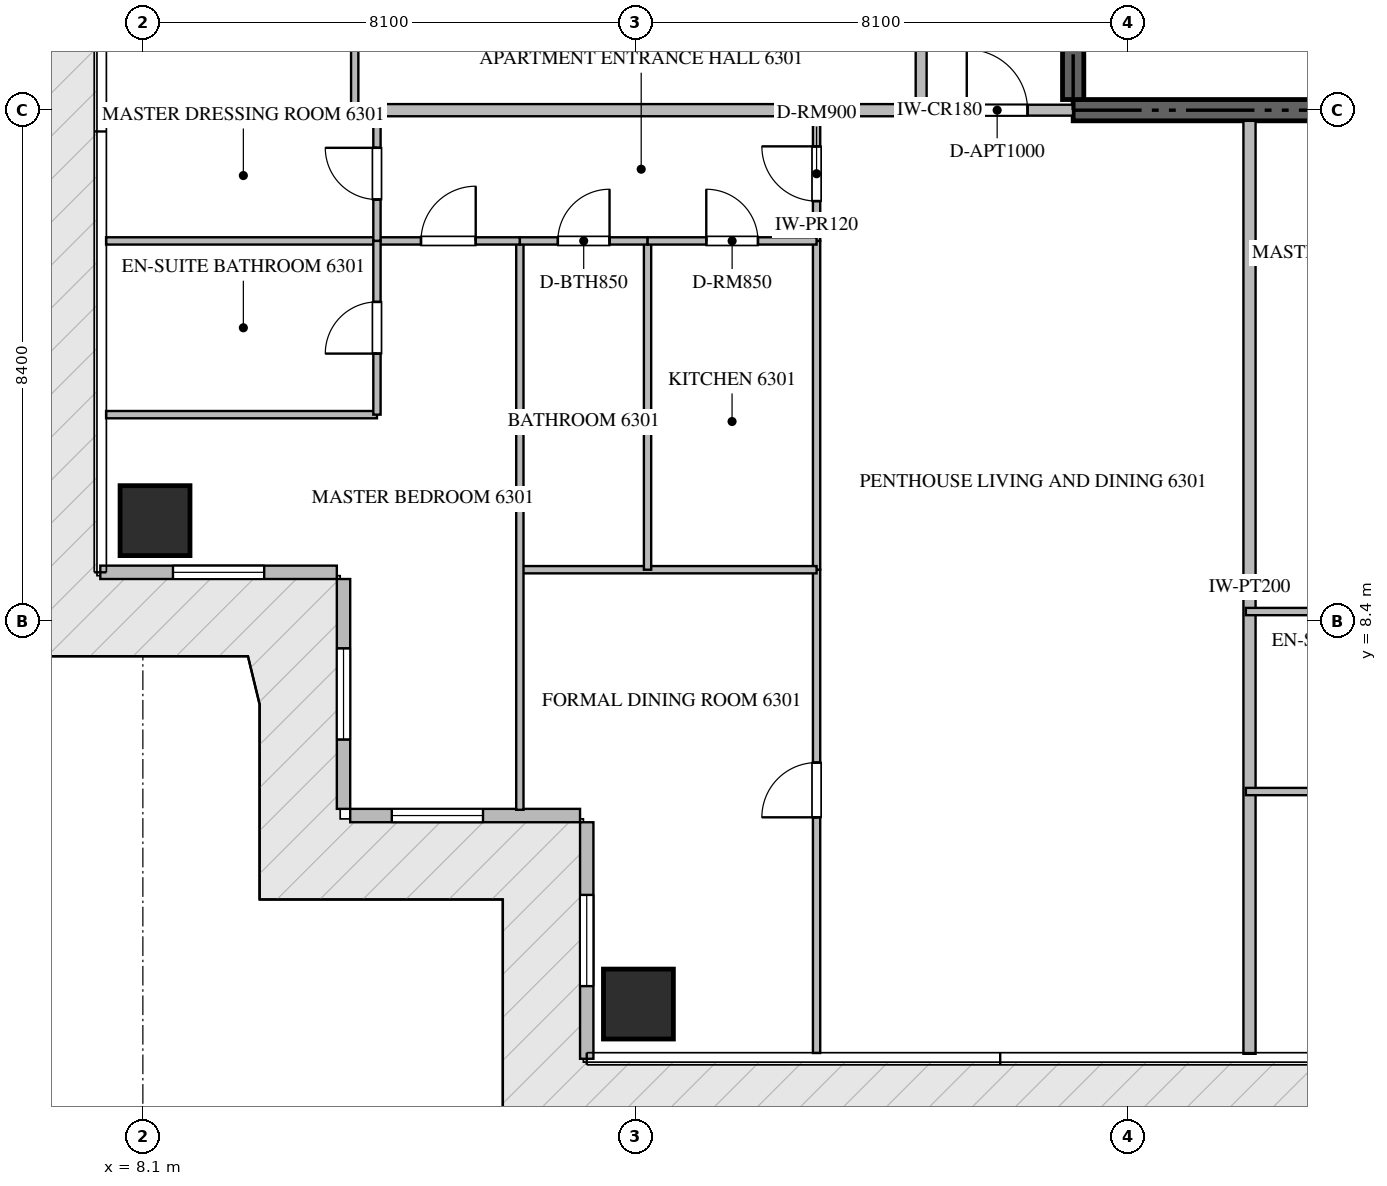
"""IFC4 building model, lengths in metres.
Left out: names, types, materials, properties, quantities, classifications, styles, units other than length and angle.
Written with IfcOpenShell. Run it as: python <this file> out.ifc"""

import sys

from ifc_helpers import new_model, si_unit, direction, frame, frame_2d, origin, origin_2d, place, context, subcontext, project, spatial, rectangle, extrude, source, transform, mapped, element, fill, save


model = new_model("IFC4")
c1 = context("Model", 3, precision=1e-05, world=origin(), true_north=direction((0.0, 1.0)))
c2 = subcontext(c1, "Body", "Model", "MODEL_VIEW")
j1 = project(units=[si_unit("LENGTHUNIT", "METRE"), si_unit("PLANEANGLEUNIT", "RADIAN")], contexts=[c1])
p1 = place(None, origin())
s1 = spatial("IfcSite", under=j1, at=p1, CompositionType="ELEMENT")
p2 = place(p1, origin())
s2 = spatial("IfcBuilding", under=s1, at=p2, CompositionType="ELEMENT")
p3 = place(p2, frame((0.0, 0.0, 252.8)))
s3 = spatial("IfcBuildingStorey", under=s2, at=p3, CompositionType="ELEMENT", Elevation=252.8)
p4 = place(p3, frame((23.4, 16.8, -0.26), z_axis=(0.0, 0.0, 1.0), x_axis=(1.0, 0.0, 0.0)))
e1 = element("IfcWall", 1, at=p4, inside=s3, PredefinedType="SHEAR", context=c2, shape_type="SweptSolid", body=[
    extrude(rectangle(XDim=18.0, YDim=0.35, at=frame_2d((9.0, 0.0))), origin(), (0.0, 0.0, 1.0), 3.848),
])
p5 = place(p3, frame((23.4, 16.975, -0.26), z_axis=(0.0, 0.0, 1.0), x_axis=(0.0, 1.0, 0.0)))
e2 = element("IfcWall", 2, at=p5, inside=s3, PredefinedType="SHEAR", context=c2, shape_type="SweptSolid", body=[
    extrude(rectangle(XDim=4.875, YDim=0.35, at=frame_2d((2.438, 0.0))), origin(), (0.0, 0.0, 1.0), 3.848),
])
m1 = source(origin(), c2, "Body", "SweptSolid", [
    extrude(rectangle(XDim=1.15, YDim=1.15, at=origin_2d()), origin(), (0.0, 0.0, 1.0), 3.85),
])
for number, where, z_axis, x_axis in (
    (3, (16.25, 2.1, -0.26), (0.0, 0.0, 1.0), (1.0, 0.0, 0.0)),
    (4, (8.3, 10.05, -0.26), (0.0, 0.0, 1.0), (1.0, 0.0, 0.0)),
):
    element("IfcColumn", number, at=place(p3, frame(where, z_axis=z_axis, x_axis=x_axis)), inside=s3, PredefinedType="COLUMN", context=c2, shape_type="MappedRepresentation", body=[
        mapped(m1, transform((0.0, 0.0, 0.0), scale=1.0)),
    ])
p6 = place(p3, frame((7.4, 9.2, 0.0), z_axis=(0.0, 0.0, 1.0), x_axis=(1.0, 0.0, 0.0)))
e5 = element("IfcWall", 5, at=p6, inside=s3, PredefinedType="ELEMENTEDWALL", context=c2, shape_type="SweptSolid", body=[
    extrude(rectangle(XDim=3.89, YDim=0.22, at=frame_2d((1.945, 0.0))), origin(), (0.0, 0.0, 1.0), 3.575),
])
p7 = place(p6, frame((1.195, 0.0, 0.65)))
e6 = element("IfcOpeningElement", 6, at=p7, cuts=e5, PredefinedType="OPENING", context=c2, shape_type="SweptSolid", body=[
    extrude(rectangle(XDim=1.5, YDim=2.25, at=frame_2d((0.75, 1.125))), frame((0.0, 0.12, 0.0), z_axis=(0.0, -1.0, 0.0), x_axis=(1.0, 0.0, 0.0)), (0.0, 0.0, 1.0), 0.24),
])
p8 = place(p3, frame((11.4, 9.09, 0.0), z_axis=(0.0, 0.0, 1.0), x_axis=(0.0, -1.0, 0.0)))
e7 = element("IfcWall", 7, at=p8, inside=s3, PredefinedType="ELEMENTEDWALL", context=c2, shape_type="SweptSolid", body=[
    extrude(rectangle(XDim=3.78, YDim=0.22, at=frame_2d((1.89, 0.0))), origin(), (0.0, 0.0, 1.0), 3.575),
])
p9 = place(p8, frame((1.14, 0.0, 0.65)))
e8 = element("IfcOpeningElement", 8, at=p9, cuts=e7, PredefinedType="OPENING", context=c2, shape_type="SweptSolid", body=[
    extrude(rectangle(XDim=1.5, YDim=2.25, at=frame_2d((0.75, 1.125))), frame((0.0, 0.12, 0.0), z_axis=(0.0, -1.0, 0.0), x_axis=(1.0, 0.0, 0.0)), (0.0, 0.0, 1.0), 0.24),
])
p10 = place(p3, frame((11.51, 5.2, 0.0), z_axis=(0.0, 0.0, 1.0), x_axis=(1.0, 0.0, 0.0)))
e9 = element("IfcWall", 9, at=p10, inside=s3, PredefinedType="ELEMENTEDWALL", context=c2, shape_type="SweptSolid", body=[
    extrude(rectangle(XDim=3.78, YDim=0.22, at=frame_2d((1.89, 0.0))), origin(), (0.0, 0.0, 1.0), 3.575),
])
p11 = place(p10, frame((0.684, 0.0, 0.65)))
e10 = element("IfcOpeningElement", 10, at=p11, cuts=e9, PredefinedType="OPENING", context=c2, shape_type="SweptSolid", body=[
    extrude(rectangle(XDim=1.5, YDim=2.25, at=frame_2d((0.75, 1.125))), frame((0.0, 0.12, 0.0), z_axis=(0.0, -1.0, 0.0), x_axis=(1.0, 0.0, 0.0)), (0.0, 0.0, 1.0), 0.24),
])
p12 = place(p3, frame((15.4, 5.09, 0.0), z_axis=(0.0, 0.0, 1.0), x_axis=(0.0, -1.0, 0.0)))
e11 = element("IfcWall", 11, at=p12, inside=s3, PredefinedType="ELEMENTEDWALL", context=c2, shape_type="SweptSolid", body=[
    extrude(rectangle(XDim=3.89, YDim=0.22, at=frame_2d((1.945, 0.0))), origin(), (0.0, 0.0, 1.0), 3.575),
])
p13 = place(p12, frame((1.195, 0.0, 0.65)))
e12 = element("IfcOpeningElement", 12, at=p13, cuts=e11, PredefinedType="OPENING", context=c2, shape_type="SweptSolid", body=[
    extrude(rectangle(XDim=1.5, YDim=2.25, at=frame_2d((0.75, 1.125))), frame((0.0, 0.12, 0.0), z_axis=(0.0, -1.0, 0.0), x_axis=(1.0, 0.0, 0.0)), (0.0, 0.0, 1.0), 0.24),
])
p14 = place(p3, frame((26.3, 1.282, 0.0), z_axis=(0.0, 0.0, 1.0), x_axis=(0.0, 1.0, 0.0)))
e13 = element("IfcWall", 13, at=p14, inside=s3, PredefinedType="PARTITIONING", context=c2, shape_type="SweptSolid", body=[
    extrude(rectangle(XDim=15.343, YDim=0.2, at=frame_2d((7.671, 0.0))), origin(), (0.0, 0.0, 1.0), 3.59),
])
p15 = place(p3, frame((7.482, 16.8, 0.0), z_axis=(0.0, 0.0, 1.0), x_axis=(1.0, 0.0, 0.0)))
e14 = element("IfcWall", 14, at=p15, inside=s3, PredefinedType="PARTITIONING", context=c2, shape_type="SweptSolid", body=[
    extrude(rectangle(XDim=13.418, YDim=0.2, at=frame_2d((6.709, 0.0))), origin(), (0.0, 0.0, 1.0), 3.59),
])
p16 = place(p3, frame((20.902, 16.8, 0.0), z_axis=(0.0, 0.0, 1.0), x_axis=(1.0, 0.0, 0.0)))
e15 = element("IfcWall", 15, at=p16, inside=s3, PredefinedType="PARTITIONING", context=c2, shape_type="SweptSolid", body=[
    extrude(rectangle(XDim=2.496, YDim=0.18, at=frame_2d((1.248, 0.0))), origin(), (0.0, 0.0, 1.0), 3.59),
])
p17 = place(p16, frame((0.748, 0.0, 0.0)))
e16 = element("IfcOpeningElement", 16, at=p17, cuts=e15, PredefinedType="OPENING", context=c2, shape_type="SweptSolid", body=[
    extrude(rectangle(XDim=1.0, YDim=2.15, at=frame_2d((0.5, 1.075))), frame((0.0, 0.1, 0.0), z_axis=(0.0, -1.0, 0.0), x_axis=(1.0, 0.0, 0.0)), (0.0, 0.0, 1.0), 0.2),
])
p18 = place(p3, frame((20.9, 16.8, 0.0), z_axis=(0.0, 0.0, 1.0), x_axis=(0.0, 1.0, 0.0)))
e17 = element("IfcWall", 17, at=p18, inside=s3, PredefinedType="PARTITIONING", context=c2, shape_type="SweptSolid", body=[
    extrude(rectangle(XDim=16.8, YDim=0.18, at=frame_2d((8.4, 0.0))), origin(), (0.0, 0.0, 1.0), 3.59),
])
p19 = place(p18, frame((14.5, 0.0, 0.0)))
e18 = element("IfcOpeningElement", 18, at=p19, cuts=e17, PredefinedType="OPENING", context=c2, shape_type="SweptSolid", body=[
    extrude(rectangle(XDim=1.0, YDim=2.15, at=frame_2d((0.5, 1.075))), frame((0.0, 0.1, 0.0), z_axis=(0.0, -1.0, 0.0), x_axis=(1.0, 0.0, 0.0)), (0.0, 0.0, 1.0), 0.2),
])
p20 = place(p3, frame((19.18, 14.65, 0.0), z_axis=(0.0, 0.0, 1.0), x_axis=(0.0, 1.0, 0.0)))
e19 = element("IfcWall", 19, at=p20, inside=s3, PredefinedType="PARTITIONING", context=c2, shape_type="SweptSolid", body=[
    extrude(rectangle(XDim=2.21, YDim=0.12, at=frame_2d((1.105, 0.0))), origin(), (0.0, 0.0, 1.0), 3.59),
])
p21 = place(p20, frame((0.655, 0.0, 0.0)))
e20 = element("IfcOpeningElement", 20, at=p21, cuts=e19, PredefinedType="OPENING", context=c2, shape_type="SweptSolid", body=[
    extrude(rectangle(XDim=0.9, YDim=2.1, at=frame_2d((0.45, 1.05))), frame((0.0, 0.07, 0.0), z_axis=(0.0, -1.0, 0.0), x_axis=(1.0, 0.0, 0.0)), (0.0, 0.0, 1.0), 0.14),
])
p22 = place(p3, frame((19.18, 1.295, 0.0), z_axis=(0.0, 0.0, 1.0), x_axis=(0.0, 1.0, 0.0)))
e21 = element("IfcWall", 21, at=p22, inside=s3, PredefinedType="PARTITIONING", context=c2, shape_type="SweptSolid", body=[
    extrude(rectangle(XDim=7.948, YDim=0.12, at=frame_2d((3.974, 0.0))), origin(), (0.0, 0.0, 1.0), 3.59),
])
p23 = place(p22, frame((3.876, 0.0, 0.0)))
e22 = element("IfcOpeningElement", 22, at=p23, cuts=e21, PredefinedType="OPENING", context=c2, shape_type="SweptSolid", body=[
    extrude(rectangle(XDim=0.9, YDim=2.1, at=frame_2d((0.45, 1.05))), frame((0.0, 0.07, 0.0), z_axis=(0.0, -1.0, 0.0), x_axis=(1.0, 0.0, 0.0)), (0.0, 0.0, 1.0), 0.14),
])
p24 = place(p3, frame((19.18, 9.245, 0.0), z_axis=(0.0, 0.0, 1.0), x_axis=(0.0, 1.0, 0.0)))
e23 = element("IfcWall", 23, at=p24, inside=s3, PredefinedType="PARTITIONING", context=c2, shape_type="SweptSolid", body=[
    extrude(rectangle(XDim=5.403, YDim=0.12, at=frame_2d((2.701, 0.0))), origin(), (0.0, 0.0, 1.0), 3.59),
])
p25 = place(p3, frame((14.3, 9.243, 0.0), z_axis=(0.0, 0.0, 1.0), x_axis=(1.0, 0.0, 0.0)))
e24 = element("IfcWall", 24, at=p25, inside=s3, PredefinedType="PARTITIONING", context=c2, shape_type="SweptSolid", body=[
    extrude(rectangle(XDim=4.88, YDim=0.12, at=frame_2d((2.44, 0.0))), origin(), (0.0, 0.0, 1.0), 3.59),
])
p26 = place(p3, frame((14.3, 5.295, 0.0), z_axis=(0.0, 0.0, 1.0), x_axis=(0.0, 1.0, 0.0)))
e25 = element("IfcWall", 25, at=p26, inside=s3, PredefinedType="PARTITIONING", context=c2, shape_type="SweptSolid", body=[
    extrude(rectangle(XDim=9.355, YDim=0.12, at=frame_2d((4.677, 0.0))), origin(), (0.0, 0.0, 1.0), 3.59),
])
p27 = place(p3, frame((16.4, 9.243, 0.0), z_axis=(0.0, 0.0, 1.0), x_axis=(0.0, 1.0, 0.0)))
e26 = element("IfcWall", 26, at=p27, inside=s3, PredefinedType="PARTITIONING", context=c2, shape_type="SweptSolid", body=[
    extrude(rectangle(XDim=5.407, YDim=0.12, at=frame_2d((2.704, 0.0))), origin(), (0.0, 0.0, 1.0), 3.122),
])
p28 = place(p3, frame((14.3, 14.65, 0.0), z_axis=(0.0, 0.0, 1.0), x_axis=(1.0, 0.0, 0.0)))
e27 = element("IfcWall", 27, at=p28, inside=s3, PredefinedType="PARTITIONING", context=c2, shape_type="SweptSolid", body=[
    extrude(rectangle(XDim=2.1, YDim=0.12, at=frame_2d((1.05, 0.0))), origin(), (0.0, 0.0, 1.0), 3.59),
])
p29 = place(p28, frame((0.625, 0.0, 0.0)))
e28 = element("IfcOpeningElement", 28, at=p29, cuts=e27, PredefinedType="OPENING", context=c2, shape_type="SweptSolid", body=[
    extrude(rectangle(XDim=0.85, YDim=2.1, at=frame_2d((0.425, 1.05))), frame((0.0, 0.07, 0.0), z_axis=(0.0, -1.0, 0.0), x_axis=(1.0, 0.0, 0.0)), (0.0, 0.0, 1.0), 0.14),
])
p30 = place(p3, frame((16.402, 14.65, 0.0), z_axis=(0.0, 0.0, 1.0), x_axis=(1.0, 0.0, 0.0)))
e29 = element("IfcWall", 29, at=p30, inside=s3, PredefinedType="PARTITIONING", context=c2, shape_type="SweptSolid", body=[
    extrude(rectangle(XDim=2.778, YDim=0.12, at=frame_2d((1.389, 0.0))), origin(), (0.0, 0.0, 1.0), 3.59),
])
p31 = place(p30, frame((0.964, 0.0, 0.0)))
e30 = element("IfcOpeningElement", 30, at=p31, cuts=e29, PredefinedType="OPENING", context=c2, shape_type="SweptSolid", body=[
    extrude(rectangle(XDim=0.85, YDim=2.1, at=frame_2d((0.425, 1.05))), frame((0.0, 0.07, 0.0), z_axis=(0.0, -1.0, 0.0), x_axis=(1.0, 0.0, 0.0)), (0.0, 0.0, 1.0), 0.14),
])
p32 = place(p3, frame((11.95, 14.65, 0.0), z_axis=(0.0, 0.0, 1.0), x_axis=(1.0, 0.0, 0.0)))
e31 = element("IfcWall", 31, at=p32, inside=s3, PredefinedType="PARTITIONING", context=c2, shape_type="SweptSolid", body=[
    extrude(rectangle(XDim=2.348, YDim=0.12, at=frame_2d((1.174, 0.0))), origin(), (0.0, 0.0, 1.0), 3.59),
])
p33 = place(p32, frame((0.724, 0.0, 0.0)))
e32 = element("IfcOpeningElement", 32, at=p33, cuts=e31, PredefinedType="OPENING", context=c2, shape_type="SweptSolid", body=[
    extrude(rectangle(XDim=0.9, YDim=2.1, at=frame_2d((0.45, 1.05))), frame((0.0, 0.07, 0.0), z_axis=(0.0, -1.0, 0.0), x_axis=(1.0, 0.0, 0.0)), (0.0, 0.0, 1.0), 0.14),
])
p34 = place(p3, frame((7.495, 11.793, 0.0), z_axis=(0.0, 0.0, 1.0), x_axis=(1.0, 0.0, 0.0)))
e33 = element("IfcWall", 33, at=p34, inside=s3, PredefinedType="PARTITIONING", context=c2, shape_type="SweptSolid", body=[
    extrude(rectangle(XDim=4.455, YDim=0.12, at=frame_2d((2.228, 0.0))), origin(), (0.0, 0.0, 1.0), 3.59),
])
p35 = place(p3, frame((7.495, 14.65, 0.0), z_axis=(0.0, 0.0, 1.0), x_axis=(1.0, 0.0, 0.0)))
e34 = element("IfcWall", 34, at=p35, inside=s3, PredefinedType="PARTITIONING", context=c2, shape_type="SweptSolid", body=[
    extrude(rectangle(XDim=4.453, YDim=0.12, at=frame_2d((2.227, 0.0))), origin(), (0.0, 0.0, 1.0), 3.59),
])
p36 = place(p3, frame((11.95, 11.793, 0.0), z_axis=(0.0, 0.0, 1.0), x_axis=(0.0, 1.0, 0.0)))
e35 = element("IfcWall", 35, at=p36, inside=s3, PredefinedType="PARTITIONING", context=c2, shape_type="SweptSolid", body=[
    extrude(rectangle(XDim=2.857, YDim=0.12, at=frame_2d((1.428, 0.0))), origin(), (0.0, 0.0, 1.0), 3.59),
])
p37 = place(p36, frame((1.004, 0.0, 0.0)))
e36 = element("IfcOpeningElement", 36, at=p37, cuts=e35, PredefinedType="OPENING", context=c2, shape_type="SweptSolid", body=[
    extrude(rectangle(XDim=0.85, YDim=2.1, at=frame_2d((0.425, 1.05))), frame((0.0, 0.07, 0.0), z_axis=(0.0, -1.0, 0.0), x_axis=(1.0, 0.0, 0.0)), (0.0, 0.0, 1.0), 0.14),
])
p38 = place(p3, frame((11.95, 14.652, 0.0), z_axis=(0.0, 0.0, 1.0), x_axis=(0.0, 1.0, 0.0)))
e37 = element("IfcWall", 37, at=p38, inside=s3, PredefinedType="PARTITIONING", context=c2, shape_type="SweptSolid", body=[
    extrude(rectangle(XDim=2.208, YDim=0.12, at=frame_2d((1.104, 0.0))), origin(), (0.0, 0.0, 1.0), 3.59),
])
p39 = place(p38, frame((0.679, 0.0, 0.0)))
e38 = element("IfcOpeningElement", 38, at=p39, cuts=e37, PredefinedType="OPENING", context=c2, shape_type="SweptSolid", body=[
    extrude(rectangle(XDim=0.85, YDim=2.1, at=frame_2d((0.425, 1.05))), frame((0.0, 0.07, 0.0), z_axis=(0.0, -1.0, 0.0), x_axis=(1.0, 0.0, 0.0)), (0.0, 0.0, 1.0), 0.14),
])
for number, where, z_axis, x_axis in (
    (39, (26.24, 5.595, 0.0), (0.0, 0.0, 1.0), (1.0, 0.0, 0.0)),
    (40, (26.24, 8.555, 0.0), (0.0, 0.0, 1.0), (1.0, 0.0, 0.0)),
):
    element("IfcWall", number, at=place(p3, frame(where, z_axis=z_axis, x_axis=x_axis)), inside=s3, PredefinedType="PARTITIONING", context=c2, shape_type="SweptSolid", body=[
        extrude(rectangle(XDim=4.79, YDim=0.12, at=frame_2d((2.395, 0.0))), origin(), (0.0, 0.0, 1.0), 3.59),
    ])
p40 = place(p3, frame((11.584, 16.74, 0.0), z_axis=(0.0, 0.0, 1.0), x_axis=(0.0, 1.0, 0.0)))
e41 = element("IfcWall", 41, at=p40, inside=s3, PredefinedType="PARTITIONING", context=c2, shape_type="SweptSolid", body=[
    extrude(rectangle(XDim=10.48, YDim=0.12, at=frame_2d((5.24, 0.0))), origin(), (0.0, 0.0, 1.0), 3.59),
])
m2 = source(origin(), c2, "Body", "SweptSolid", [
    extrude(rectangle(XDim=1.5, YDim=2.25, at=frame_2d((0.75, 1.125))), frame((0.0, 0.03, 0.0), z_axis=(0.0, -1.0, 0.0), x_axis=(1.0, 0.0, 0.0)), (0.0, 0.0, 1.0), 0.06),
])
p41 = place(p7, origin())
e42 = element("IfcWindow", 42, at=p41, inside=s3, PartitioningType="SINGLE_PANEL", PredefinedType="WINDOW", context=c2, shape_type="MappedRepresentation", body=[
    mapped(m2, transform((0.0, 0.0, 0.0), scale=1.0)),
])
fill(e6, e42)
p42 = place(p9, origin())
e43 = element("IfcWindow", 43, at=p42, inside=s3, PartitioningType="SINGLE_PANEL", PredefinedType="WINDOW", context=c2, shape_type="MappedRepresentation", body=[
    mapped(m2, transform((0.0, 0.0, 0.0), scale=1.0)),
])
fill(e8, e43)
p43 = place(p11, origin())
e44 = element("IfcWindow", 44, at=p43, inside=s3, PartitioningType="SINGLE_PANEL", PredefinedType="WINDOW", context=c2, shape_type="MappedRepresentation", body=[
    mapped(m2, transform((0.0, 0.0, 0.0), scale=1.0)),
])
fill(e10, e44)
p44 = place(p13, origin())
e45 = element("IfcWindow", 45, at=p44, inside=s3, PartitioningType="SINGLE_PANEL", PredefinedType="WINDOW", context=c2, shape_type="MappedRepresentation", body=[
    mapped(m2, transform((0.0, 0.0, 0.0), scale=1.0)),
])
fill(e12, e45)
m3 = source(origin(), c2, "Body", "SweptSolid", [
    extrude(rectangle(XDim=1.0, YDim=2.15, at=frame_2d((0.5, 1.075))), frame((0.0, 0.025, 0.0), z_axis=(0.0, -1.0, 0.0), x_axis=(1.0, 0.0, 0.0)), (0.0, 0.0, 1.0), 0.05),
])
p45 = place(p17, origin())
e46 = element("IfcDoor", 46, at=p45, inside=s3, OperationType="SINGLE_SWING_LEFT", PredefinedType="DOOR", context=c2, shape_type="MappedRepresentation", body=[
    mapped(m3, transform((0.0, 0.0, 0.0), scale=1.0)),
])
fill(e16, e46)
m4 = source(origin(), c2, "Body", "SweptSolid", [
    extrude(rectangle(XDim=0.9, YDim=2.1, at=frame_2d((0.45, 1.05))), frame((0.0, 0.025, 0.0), z_axis=(0.0, -1.0, 0.0), x_axis=(1.0, 0.0, 0.0)), (0.0, 0.0, 1.0), 0.05),
])
p46 = place(p21, origin())
e47 = element("IfcDoor", 47, at=p46, inside=s3, OperationType="SINGLE_SWING_RIGHT", PredefinedType="DOOR", context=c2, shape_type="MappedRepresentation", body=[
    mapped(m4, transform((0.0, 0.0, 0.0), scale=1.0)),
])
fill(e20, e47)
p47 = place(p23, origin())
e48 = element("IfcDoor", 48, at=p47, inside=s3, OperationType="SINGLE_SWING_LEFT", PredefinedType="DOOR", context=c2, shape_type="MappedRepresentation", body=[
    mapped(m4, transform((0.0, 0.0, 0.0), scale=1.0)),
])
fill(e22, e48)
m5 = source(origin(), c2, "Body", "SweptSolid", [
    extrude(rectangle(XDim=0.85, YDim=2.1, at=frame_2d((0.425, 1.05))), frame((0.0, 0.025, 0.0), z_axis=(0.0, -1.0, 0.0), x_axis=(1.0, 0.0, 0.0)), (0.0, 0.0, 1.0), 0.05),
])
p48 = place(p29, origin())
e49 = element("IfcDoor", 49, at=p48, inside=s3, OperationType="SINGLE_SWING_RIGHT", PredefinedType="DOOR", context=c2, shape_type="MappedRepresentation", body=[
    mapped(m5, transform((0.0, 0.0, 0.0), scale=1.0)),
])
fill(e28, e49)
p49 = place(p31, origin())
e50 = element("IfcDoor", 50, at=p49, inside=s3, OperationType="SINGLE_SWING_LEFT", PredefinedType="DOOR", context=c2, shape_type="MappedRepresentation", body=[
    mapped(m5, transform((0.0, 0.0, 0.0), scale=1.0)),
])
fill(e30, e50)
p50 = place(p33, origin())
e51 = element("IfcDoor", 51, at=p50, inside=s3, OperationType="SINGLE_SWING_RIGHT", PredefinedType="DOOR", context=c2, shape_type="MappedRepresentation", body=[
    mapped(m4, transform((0.0, 0.0, 0.0), scale=1.0)),
])
fill(e32, e51)
p51 = place(p37, origin())
e52 = element("IfcDoor", 52, at=p51, inside=s3, OperationType="SINGLE_SWING_LEFT", PredefinedType="DOOR", context=c2, shape_type="MappedRepresentation", body=[
    mapped(m5, transform((0.0, 0.0, 0.0), scale=1.0)),
])
fill(e36, e52)
p52 = place(p39, origin())
e53 = element("IfcDoor", 53, at=p52, inside=s3, OperationType="SINGLE_SWING_RIGHT", PredefinedType="DOOR", context=c2, shape_type="MappedRepresentation", body=[
    mapped(m5, transform((0.0, 0.0, 0.0), scale=1.0)),
])
fill(e38, e53)
save(model, sys.argv[1])
